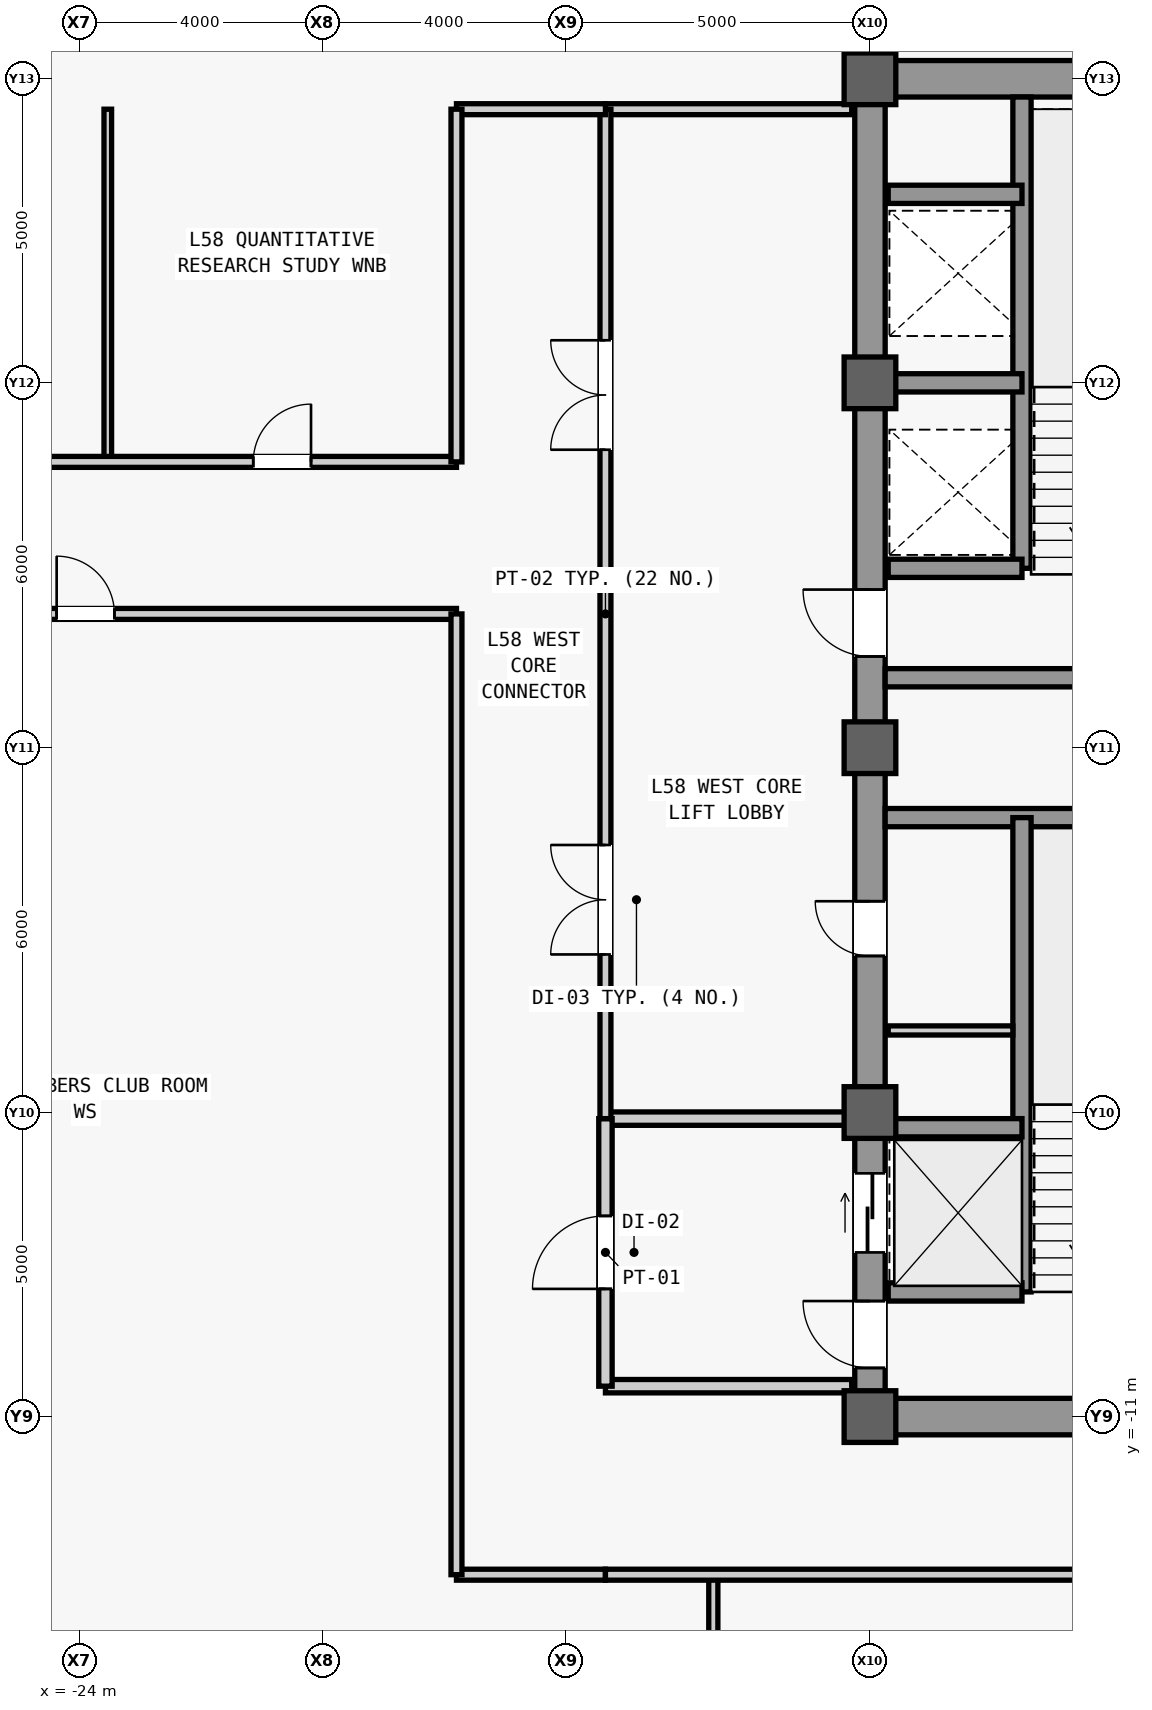
"""IFC4 building model, lengths in metres.
Left out: names, types, materials, properties, quantities, classifications, styles, units other than length and angle.
Written with IfcOpenShell. Run it as: python <this file> out.ifc"""

import sys

from ifc_helpers import new_model, si_unit, direction, frame, frame_2d, origin, origin_2d, place, context, subcontext, project, spatial, rectangle, extrude, source, transform, mapped, element, fill, save


model = new_model("IFC4")
c1 = context("Model", 3, precision=1e-05, world=origin(), true_north=direction((0.0, 1.0)))
c2 = subcontext(c1, "Body", "Model", "MODEL_VIEW")
j1 = project(units=[si_unit("LENGTHUNIT", "METRE"), si_unit("PLANEANGLEUNIT", "RADIAN")], contexts=[c1])
p1 = place(None, origin())
s1 = spatial("IfcSite", under=j1, at=p1, CompositionType="ELEMENT")
p2 = place(p1, origin())
s2 = spatial("IfcBuilding", under=s1, at=p2, CompositionType="ELEMENT")
p3 = place(p2, frame((0.0, 0.0, 247.1)))
s3 = spatial("IfcBuildingStorey", under=s2, at=p3, CompositionType="ELEMENT", Elevation=247.1)
m1 = source(origin(), c2, "Body", "SweptSolid", [
    extrude(rectangle(XDim=22.0, YDim=0.5, at=frame_2d((11.0, 0.0))), origin(), (0.0, 0.0, 1.0), 3.78),
])
p4 = place(p3, frame((-11.0, -11.0, 0.0), z_axis=(0.0, 0.0, 1.0), x_axis=(0.0, 1.0, 0.0)))
e1 = element("IfcWall", 1, at=p4, inside=s3, PredefinedType="SHEAR", context=c2, shape_type="MappedRepresentation", body=[
    mapped(m1, transform((0.0, 0.0, 0.0), scale=1.0)),
])
m2 = source(origin(), c2, "Body", "SweptSolid", [
    extrude(rectangle(XDim=1.1, YDim=2.2, at=frame_2d((0.55, 1.1))), frame((0.0, 0.26, 0.0), z_axis=(0.0, -1.0, 0.0), x_axis=(1.0, 0.0, 0.0)), (0.0, 0.0, 1.0), 0.52),
])
p5 = place(p4, frame((0.8, 0.0, 0.0)))
e2 = element("IfcOpeningElement", 2, at=p5, cuts=e1, PredefinedType="OPENING", context=c2, shape_type="MappedRepresentation", body=[
    mapped(m2, transform((0.0, 0.0, 0.0), scale=1.0)),
])
p6 = place(p4, frame((12.5, 0.0, 0.0)))
e3 = element("IfcOpeningElement", 3, at=p6, cuts=e1, PredefinedType="OPENING", context=c2, shape_type="MappedRepresentation", body=[
    mapped(m2, transform((0.0, 0.0, 0.0), scale=1.0)),
])
m3 = source(origin(), c2, "Body", "SweptSolid", [
    extrude(rectangle(XDim=0.9, YDim=2.15, at=frame_2d((0.45, 1.075))), frame((0.0, 0.26, 0.0), z_axis=(0.0, -1.0, 0.0), x_axis=(1.0, 0.0, 0.0)), (0.0, 0.0, 1.0), 0.52),
])
p7 = place(p4, frame((7.575, 0.0, 0.0)))
e4 = element("IfcOpeningElement", 4, at=p7, cuts=e1, PredefinedType="OPENING", context=c2, shape_type="MappedRepresentation", body=[
    mapped(m3, transform((0.0, 0.0, 0.0), scale=1.0)),
])
m4 = source(origin(), c2, "Body", "SweptSolid", [
    extrude(rectangle(XDim=1.3, YDim=2.3, at=frame_2d((0.65, 1.15))), frame((0.0, 0.26, 0.0), z_axis=(0.0, -1.0, 0.0), x_axis=(1.0, 0.0, 0.0)), (0.0, 0.0, 1.0), 0.52),
])
p8 = place(p4, frame((2.7, 0.0, 0.0)))
e5 = element("IfcOpeningElement", 5, at=p8, cuts=e1, PredefinedType="OPENING", context=c2, shape_type="MappedRepresentation", body=[
    mapped(m4, transform((0.0, 0.0, 0.0), scale=1.0)),
])
m5 = source(origin(), c2, "Body", "SweptSolid", [
    extrude(rectangle(XDim=5.9, YDim=0.6, at=frame_2d((2.95, 0.0))), origin(), (0.0, 0.0, 1.0), 3.78),
])
for number, where, z_axis, x_axis in (
    (6, (-10.75, -11.0, 0.0), (0.0, 0.0, 1.0), (1.0, 0.0, 0.0)),
    (7, (-10.75, 11.0, 0.0), (0.0, 0.0, 1.0), (1.0, 0.0, 0.0)),
):
    element("IfcWall", number, at=place(p3, frame(where, z_axis=z_axis, x_axis=x_axis)), inside=s3, PredefinedType="SHEAR", context=c2, shape_type="MappedRepresentation", body=[
        mapped(m5, transform((0.0, 0.0, 0.0), scale=1.0)),
    ])
m6 = source(origin(), c2, "Body", "SweptSolid", [
    extrude(rectangle(XDim=5.65, YDim=0.3, at=frame_2d((2.825, 0.0))), origin(), (0.0, 0.0, 1.0), 3.78),
])
for number, where, z_axis, x_axis in (
    (8, (-10.75, -1.15, 0.0), (0.0, 0.0, 1.0), (1.0, 0.0, 0.0)),
    (9, (-10.75, 1.15, 0.0), (0.0, 0.0, 1.0), (1.0, 0.0, 0.0)),
):
    element("IfcWall", number, at=place(p3, frame(where, z_axis=z_axis, x_axis=x_axis)), inside=s3, PredefinedType="SHEAR", context=c2, shape_type="MappedRepresentation", body=[
        mapped(m6, transform((0.0, 0.0, 0.0), scale=1.0)),
    ])
m7 = source(origin(), c2, "Body", "SweptSolid", [
    extrude(rectangle(XDim=0.85, YDim=0.85, at=origin_2d()), origin(), (0.0, 0.0, 1.0), 4.0),
])
for number, where, z_axis, x_axis in (
    (10, (-11.0, -11.0, 0.0), (0.0, 0.0, 1.0), (1.0, 0.0, 0.0)),
    (11, (-11.0, -6.0, 0.0), (0.0, 0.0, 1.0), (1.0, 0.0, 0.0)),
    (12, (-11.0, 0.0, 0.0), (0.0, 0.0, 1.0), (1.0, 0.0, 0.0)),
    (13, (-11.0, 6.0, 0.0), (0.0, 0.0, 1.0), (1.0, 0.0, 0.0)),
    (14, (-11.0, 11.0, 0.0), (0.0, 0.0, 1.0), (1.0, 0.0, 0.0)),
):
    element("IfcColumn", number, at=place(p3, frame(where, z_axis=z_axis, x_axis=x_axis)), inside=s3, PredefinedType="COLUMN", context=c2, shape_type="MappedRepresentation", body=[
        mapped(m7, transform((0.0, 0.0, 0.0), scale=1.0)),
    ])
m8 = source(origin(), c2, "Body", "SweptSolid", [
    extrude(rectangle(XDim=7.8, YDim=0.3, at=frame_2d((3.9, 0.0))), origin(), (0.0, 0.0, 1.0), 3.78),
])
p9 = place(p3, frame((-8.5, -8.95, 0.0), z_axis=(0.0, 0.0, 1.0), x_axis=(0.0, 1.0, 0.0)))
e15 = element("IfcWall", 15, at=p9, inside=s3, PredefinedType="SHEAR", context=c2, shape_type="MappedRepresentation", body=[
    mapped(m8, transform((0.0, 0.0, 0.0), scale=1.0)),
])
m9 = source(origin(), c2, "Body", "SweptSolid", [
    extrude(rectangle(XDim=2.2, YDim=0.3, at=frame_2d((1.1, 0.0))), origin(), (0.0, 0.0, 1.0), 3.78),
])
for number, where, z_axis, x_axis in (
    (16, (-10.7, -8.95, 0.0), (0.0, 0.0, 1.0), (1.0, 0.0, 0.0)),
    (17, (-10.7, -6.25, 0.0), (0.0, 0.0, 1.0), (1.0, 0.0, 0.0)),
):
    element("IfcWall", number, at=place(p3, frame(where, z_axis=z_axis, x_axis=x_axis)), inside=s3, PredefinedType="SHEAR", context=c2, shape_type="MappedRepresentation", body=[
        mapped(m9, transform((0.0, 0.0, 0.0), scale=1.0)),
    ])
m10 = source(origin(), c2, "Body", "SweptSolid", [
    extrude(rectangle(XDim=7.75, YDim=0.3, at=frame_2d((3.875, 0.0))), origin(), (0.0, 0.0, 1.0), 3.78),
])
p10 = place(p3, frame((-8.5, 2.95, 0.0), z_axis=(0.0, 0.0, 1.0), x_axis=(0.0, 1.0, 0.0)))
e18 = element("IfcWall", 18, at=p10, inside=s3, PredefinedType="SHEAR", context=c2, shape_type="MappedRepresentation", body=[
    mapped(m10, transform((0.0, 0.0, 0.0), scale=1.0)),
])
for number, where, z_axis, x_axis in (
    (19, (-10.7, 2.95, 0.0), (0.0, 0.0, 1.0), (1.0, 0.0, 0.0)),
    (20, (-10.7, 6.0, 0.0), (0.0, 0.0, 1.0), (1.0, 0.0, 0.0)),
    (21, (-10.7, 9.1, 0.0), (0.0, 0.0, 1.0), (1.0, 0.0, 0.0)),
):
    element("IfcWall", number, at=place(p3, frame(where, z_axis=z_axis, x_axis=x_axis)), inside=s3, PredefinedType="SHEAR", context=c2, shape_type="MappedRepresentation", body=[
        mapped(m9, transform((0.0, 0.0, 0.0), scale=1.0)),
    ])
m11 = source(origin(), c2, "Body", "SweptSolid", [
    extrude(rectangle(XDim=2.05, YDim=0.15, at=frame_2d((1.025, 0.0))), origin(), (0.0, 0.0, 1.0), 3.78),
])
p11 = place(p3, frame((-10.7, -4.65, 0.0), z_axis=(0.0, 0.0, 1.0), x_axis=(1.0, 0.0, 0.0)))
e22 = element("IfcWall", 22, at=p11, inside=s3, PredefinedType="PARTITIONING", context=c2, shape_type="MappedRepresentation", body=[
    mapped(m11, transform((0.0, 0.0, 0.0), scale=1.0)),
])
m12 = source(origin(), c2, "Body", "SweptSolid", [
    extrude(rectangle(XDim=4.05, YDim=0.22, at=frame_2d((2.025, 0.0))), origin(), (0.0, 0.0, 1.0), 3.78),
])
p12 = place(p3, frame((-15.35, -10.5, 0.0), z_axis=(0.0, 0.0, 1.0), x_axis=(1.0, 0.0, 0.0)))
e23 = element("IfcWall", 23, at=p12, inside=s3, PredefinedType="PARTITIONING", context=c2, shape_type="MappedRepresentation", body=[
    mapped(m12, transform((0.0, 0.0, 0.0), scale=1.0)),
])
m13 = source(origin(), c2, "Body", "SweptSolid", [
    extrude(rectangle(XDim=4.05, YDim=0.22, at=frame_2d((2.025, 0.0))), origin(), (0.0, 0.0, 1.0), 3.085),
])
p13 = place(p3, frame((-15.35, -6.1, 0.0), z_axis=(0.0, 0.0, 1.0), x_axis=(1.0, 0.0, 0.0)))
e24 = element("IfcWall", 24, at=p13, inside=s3, PredefinedType="PARTITIONING", context=c2, shape_type="MappedRepresentation", body=[
    mapped(m13, transform((0.0, 0.0, 0.0), scale=1.0)),
])
m14 = source(origin(), c2, "Body", "SweptSolid", [
    extrude(rectangle(XDim=4.4, YDim=0.22, at=frame_2d((2.2, 0.0))), origin(), (0.0, 0.0, 1.0), 3.78),
])
p14 = place(p3, frame((-15.35, -10.5, 0.0), z_axis=(0.0, 0.0, 1.0), x_axis=(0.0, 1.0, 0.0)))
e25 = element("IfcWall", 25, at=p14, inside=s3, PredefinedType="PARTITIONING", context=c2, shape_type="MappedRepresentation", body=[
    mapped(m14, transform((0.0, 0.0, 0.0), scale=1.0)),
])
m15 = source(origin(), c2, "Body", "SweptSolid", [
    extrude(rectangle(XDim=1.2, YDim=2.2, at=frame_2d((0.6, 1.1))), frame((0.0, 0.12, 0.0), z_axis=(0.0, -1.0, 0.0), x_axis=(1.0, 0.0, 0.0)), (0.0, 0.0, 1.0), 0.24),
])
p15 = place(p14, frame((1.6, 0.0, 0.0)))
e26 = element("IfcOpeningElement", 26, at=p15, cuts=e25, PredefinedType="OPENING", context=c2, shape_type="MappedRepresentation", body=[
    mapped(m15, transform((0.0, 0.0, 0.0), scale=1.0)),
])
m16 = source(origin(), c2, "Body", "SweptSolid", [
    extrude(rectangle(XDim=4.05, YDim=0.18, at=frame_2d((2.025, 0.0))), origin(), (0.0, 0.0, 1.0), 3.78),
])
p16 = place(p3, frame((-15.35, 10.5, 0.0), z_axis=(0.0, 0.0, 1.0), x_axis=(1.0, 0.0, 0.0)))
e27 = element("IfcWall", 27, at=p16, inside=s3, PredefinedType="PARTITIONING", context=c2, shape_type="MappedRepresentation", body=[
    mapped(m16, transform((0.0, 0.0, 0.0), scale=1.0)),
])
m17 = source(origin(), c2, "Body", "SweptSolid", [
    extrude(rectangle(XDim=16.6, YDim=0.18, at=frame_2d((8.3, 0.0))), origin(), (0.0, 0.0, 1.0), 3.78),
])
p17 = place(p3, frame((-15.35, -6.1, 0.0), z_axis=(0.0, 0.0, 1.0), x_axis=(0.0, 1.0, 0.0)))
e28 = element("IfcWall", 28, at=p17, inside=s3, PredefinedType="PARTITIONING", context=c2, shape_type="MappedRepresentation", body=[
    mapped(m17, transform((0.0, 0.0, 0.0), scale=1.0)),
])
m18 = source(origin(), c2, "Body", "SweptSolid", [
    extrude(rectangle(XDim=1.8, YDim=2.25, at=frame_2d((0.9, 1.125))), frame((0.0, 0.1, 0.0), z_axis=(0.0, -1.0, 0.0), x_axis=(1.0, 0.0, 0.0)), (0.0, 0.0, 1.0), 0.2),
])
p18 = place(p17, frame((2.7, 0.0, 0.0)))
e29 = element("IfcOpeningElement", 29, at=p18, cuts=e28, PredefinedType="OPENING", context=c2, shape_type="MappedRepresentation", body=[
    mapped(m18, transform((0.0, 0.0, 0.0), scale=1.0)),
])
p19 = place(p17, frame((11.0, 0.0, 0.0)))
e30 = element("IfcOpeningElement", 30, at=p19, cuts=e28, PredefinedType="OPENING", context=c2, shape_type="MappedRepresentation", body=[
    mapped(m18, transform((0.0, 0.0, 0.0), scale=1.0)),
])
m19 = source(origin(), c2, "Body", "SweptSolid", [
    extrude(rectangle(XDim=2.45, YDim=0.18, at=frame_2d((1.225, 0.0))), origin(), (0.0, 0.0, 1.0), 3.78),
])
for number, where, z_axis, x_axis in (
    (31, (-17.8, 10.5, 0.0), (0.0, 0.0, 1.0), (1.0, 0.0, 0.0)),
    (32, (-17.8, -13.6, 0.0), (0.0, 0.0, 1.0), (1.0, 0.0, 0.0)),
):
    element("IfcWall", number, at=place(p3, frame(where, z_axis=z_axis, x_axis=x_axis)), inside=s3, PredefinedType="PARTITIONING", context=c2, shape_type="MappedRepresentation", body=[
        mapped(m19, transform((0.0, 0.0, 0.0), scale=1.0)),
    ])
m20 = source(origin(), c2, "Body", "SweptSolid", [
    extrude(rectangle(XDim=16.4, YDim=0.15, at=frame_2d((8.2, 0.0))), origin(), (0.0, 0.0, 1.0), 3.78),
])
p20 = place(p3, frame((-13.576, -30.0, 0.0), z_axis=(0.0, 0.0, 1.0), x_axis=(0.0, 1.0, 0.0)))
e33 = element("IfcWall", 33, at=p20, inside=s3, PredefinedType="PARTITIONING", context=c2, shape_type="MappedRepresentation", body=[
    mapped(m20, transform((0.0, 0.0, 0.0), scale=1.0)),
])
m21 = source(origin(), c2, "Body", "SweptSolid", [
    extrude(rectangle(XDim=0.95, YDim=2.15, at=frame_2d((0.475, 1.075))), frame((0.0, 0.085, 0.0), z_axis=(0.0, -1.0, 0.0), x_axis=(1.0, 0.0, 0.0)), (0.0, 0.0, 1.0), 0.17),
])
p21 = place(p20, frame((11.825, 0.0, 0.0)))
e34 = element("IfcOpeningElement", 34, at=p21, cuts=e33, PredefinedType="OPENING", context=c2, shape_type="MappedRepresentation", body=[
    mapped(m21, transform((0.0, 0.0, 0.0), scale=1.0)),
])
m22 = source(origin(), c2, "Body", "SweptSolid", [
    extrude(rectangle(XDim=23.95, YDim=0.18, at=frame_2d((11.975, 0.0))), origin(), (0.0, 0.0, 1.0), 3.78),
])
p22 = place(p3, frame((-15.35, -13.6, 0.0), z_axis=(0.0, 0.0, 1.0), x_axis=(1.0, 0.0, 0.0)))
e35 = element("IfcWall", 35, at=p22, inside=s3, PredefinedType="PARTITIONING", context=c2, shape_type="MappedRepresentation", body=[
    mapped(m22, transform((0.0, 0.0, 0.0), scale=1.0)),
])
m23 = source(origin(), c2, "Body", "SweptSolid", [
    extrude(rectangle(XDim=12.2, YDim=0.18, at=frame_2d((6.1, 0.0))), origin(), (0.0, 0.0, 1.0), 3.78),
])
p23 = place(p3, frame((-30.0, 2.2, 0.0), z_axis=(0.0, 0.0, 1.0), x_axis=(1.0, 0.0, 0.0)))
e36 = element("IfcWall", 36, at=p23, inside=s3, PredefinedType="PARTITIONING", context=c2, shape_type="MappedRepresentation", body=[
    mapped(m23, transform((0.0, 0.0, 0.0), scale=1.0)),
])
m24 = source(origin(), c2, "Body", "SweptSolid", [
    extrude(rectangle(XDim=0.95, YDim=2.15, at=frame_2d((0.475, 1.075))), frame((0.0, 0.1, 0.0), z_axis=(0.0, -1.0, 0.0), x_axis=(1.0, 0.0, 0.0)), (0.0, 0.0, 1.0), 0.2),
])
p24 = place(p23, frame((5.625, 0.0, 0.0)))
e37 = element("IfcOpeningElement", 37, at=p24, cuts=e36, PredefinedType="OPENING", context=c2, shape_type="MappedRepresentation", body=[
    mapped(m24, transform((0.0, 0.0, 0.0), scale=1.0)),
])
m25 = source(origin(), c2, "Body", "SweptSolid", [
    extrude(rectangle(XDim=15.8, YDim=0.18, at=frame_2d((7.9, 0.0))), origin(), (0.0, 0.0, 1.0), 3.78),
])
p25 = place(p3, frame((-17.8, -13.6, 0.0), z_axis=(0.0, 0.0, 1.0), x_axis=(0.0, 1.0, 0.0)))
e38 = element("IfcWall", 38, at=p25, inside=s3, PredefinedType="PARTITIONING", context=c2, shape_type="MappedRepresentation", body=[
    mapped(m25, transform((0.0, 0.0, 0.0), scale=1.0)),
])
m26 = source(origin(), c2, "Body", "SweptSolid", [
    extrude(rectangle(XDim=5.8, YDim=0.125, at=frame_2d((2.9, 0.0))), origin(), (0.0, 0.0, 1.0), 3.78),
])
p26 = place(p3, frame((-23.534, 4.7, 0.0), z_axis=(0.0, 0.0, 1.0), x_axis=(0.0, 1.0, 0.0)))
e39 = element("IfcWall", 39, at=p26, inside=s3, PredefinedType="PARTITIONING", context=c2, shape_type="MappedRepresentation", body=[
    mapped(m26, transform((0.0, 0.0, 0.0), scale=1.0)),
])
p27 = place(p3, frame((-30.0, 4.7, 0.0), z_axis=(0.0, 0.0, 1.0), x_axis=(1.0, 0.0, 0.0)))
e40 = element("IfcWall", 40, at=p27, inside=s3, PredefinedType="PARTITIONING", context=c2, shape_type="MappedRepresentation", body=[
    mapped(m23, transform((0.0, 0.0, 0.0), scale=1.0)),
])
p28 = place(p27, frame((2.758, 0.0, 0.0)))
e41 = element("IfcOpeningElement", 41, at=p28, cuts=e40, PredefinedType="OPENING", context=c2, shape_type="MappedRepresentation", body=[
    mapped(m24, transform((0.0, 0.0, 0.0), scale=1.0)),
])
p29 = place(p27, frame((8.858, 0.0, 0.0)))
e42 = element("IfcOpeningElement", 42, at=p29, cuts=e40, PredefinedType="OPENING", context=c2, shape_type="MappedRepresentation", body=[
    mapped(m24, transform((0.0, 0.0, 0.0), scale=1.0)),
])
m27 = source(origin(), c2, "Body", "SweptSolid", [
    extrude(rectangle(XDim=5.8, YDim=0.18, at=frame_2d((2.9, 0.0))), origin(), (0.0, 0.0, 1.0), 3.78),
])
p30 = place(p3, frame((-17.8, 4.7, 0.0), z_axis=(0.0, 0.0, 1.0), x_axis=(0.0, 1.0, 0.0)))
e43 = element("IfcWall", 43, at=p30, inside=s3, PredefinedType="PARTITIONING", context=c2, shape_type="MappedRepresentation", body=[
    mapped(m27, transform((0.0, 0.0, 0.0), scale=1.0)),
])
m28 = source(origin(), c2, "Body", "SweptSolid", [
    extrude(rectangle(XDim=1.1, YDim=2.2, at=frame_2d((0.55, 1.1))), frame((0.0, 0.025, 0.0), z_axis=(0.0, -1.0, 0.0), x_axis=(1.0, 0.0, 0.0)), (0.0, 0.0, 1.0), 0.05),
])
p31 = place(p5, origin())
e44 = element("IfcDoor", 44, at=p31, inside=s3, OperationType="SINGLE_SWING_RIGHT", PredefinedType="DOOR", context=c2, shape_type="MappedRepresentation", body=[
    mapped(m28, transform((0.0, 0.0, 0.0), scale=1.0)),
])
fill(e2, e44)
p32 = place(p6, origin())
e45 = element("IfcDoor", 45, at=p32, inside=s3, OperationType="SINGLE_SWING_RIGHT", PredefinedType="DOOR", context=c2, shape_type="MappedRepresentation", body=[
    mapped(m28, transform((0.0, 0.0, 0.0), scale=1.0)),
])
fill(e3, e45)
m29 = source(origin(), c2, "Body", "SweptSolid", [
    extrude(rectangle(XDim=0.9, YDim=2.15, at=frame_2d((0.45, 1.075))), frame((0.0, 0.025, 0.0), z_axis=(0.0, -1.0, 0.0), x_axis=(1.0, 0.0, 0.0)), (0.0, 0.0, 1.0), 0.05),
])
p33 = place(p7, origin())
e46 = element("IfcDoor", 46, at=p33, inside=s3, OperationType="SINGLE_SWING_RIGHT", PredefinedType="DOOR", context=c2, shape_type="MappedRepresentation", body=[
    mapped(m29, transform((0.0, 0.0, 0.0), scale=1.0)),
])
fill(e4, e46)
m30 = source(origin(), c2, "Body", "SweptSolid", [
    extrude(rectangle(XDim=1.2, YDim=2.2, at=frame_2d((0.6, 1.1))), frame((0.0, 0.025, 0.0), z_axis=(0.0, -1.0, 0.0), x_axis=(1.0, 0.0, 0.0)), (0.0, 0.0, 1.0), 0.05),
])
p34 = place(p15, origin())
e47 = element("IfcDoor", 47, at=p34, inside=s3, OperationType="SINGLE_SWING_LEFT", PredefinedType="DOOR", context=c2, shape_type="MappedRepresentation", body=[
    mapped(m30, transform((0.0, 0.0, 0.0), scale=1.0)),
])
fill(e26, e47)
m31 = source(origin(), c2, "Body", "SweptSolid", [
    extrude(rectangle(XDim=1.8, YDim=2.25, at=frame_2d((0.9, 1.125))), frame((0.0, 0.025, 0.0), z_axis=(0.0, -1.0, 0.0), x_axis=(1.0, 0.0, 0.0)), (0.0, 0.0, 1.0), 0.05),
])
p35 = place(p18, origin())
e48 = element("IfcDoor", 48, at=p35, inside=s3, OperationType="SINGLE_SWING_LEFT", PredefinedType="DOOR", context=c2, shape_type="MappedRepresentation", body=[
    mapped(m31, transform((0.0, 0.0, 0.0), scale=1.0)),
])
fill(e29, e48)
p36 = place(p19, origin())
e49 = element("IfcDoor", 49, at=p36, inside=s3, OperationType="SINGLE_SWING_RIGHT", PredefinedType="DOOR", context=c2, shape_type="MappedRepresentation", body=[
    mapped(m31, transform((0.0, 0.0, 0.0), scale=1.0)),
])
fill(e30, e49)
m32 = source(origin(), c2, "Body", "SweptSolid", [
    extrude(rectangle(XDim=0.95, YDim=2.15, at=frame_2d((0.475, 1.075))), frame((0.0, 0.025, 0.0), z_axis=(0.0, -1.0, 0.0), x_axis=(1.0, 0.0, 0.0)), (0.0, 0.0, 1.0), 0.05),
])
p37 = place(p24, origin())
e50 = element("IfcDoor", 50, at=p37, inside=s3, OperationType="SINGLE_SWING_LEFT", PredefinedType="DOOR", context=c2, shape_type="MappedRepresentation", body=[
    mapped(m32, transform((0.0, 0.0, 0.0), scale=1.0)),
])
fill(e37, e50)
p38 = place(p29, origin())
e51 = element("IfcDoor", 51, at=p38, inside=s3, OperationType="SINGLE_SWING_RIGHT", PredefinedType="DOOR", context=c2, shape_type="MappedRepresentation", body=[
    mapped(m32, transform((0.0, 0.0, 0.0), scale=1.0)),
])
fill(e42, e51)
m33 = source(origin(), c2, "Body", "SweptSolid", [
    extrude(rectangle(XDim=1.3, YDim=2.3, at=frame_2d((0.65, 1.15))), frame((0.0, 0.025, 0.0), z_axis=(0.0, -1.0, 0.0), x_axis=(1.0, 0.0, 0.0)), (0.0, 0.0, 1.0), 0.05),
])
p39 = place(p8, origin())
e52 = element("IfcDoor", 52, at=p39, inside=s3, OperationType="SLIDING_TO_LEFT", PredefinedType="DOOR", context=c2, shape_type="MappedRepresentation", body=[
    mapped(m33, transform((0.0, 0.0, 0.0), scale=1.0)),
])
fill(e5, e52)
save(model, sys.argv[1])
